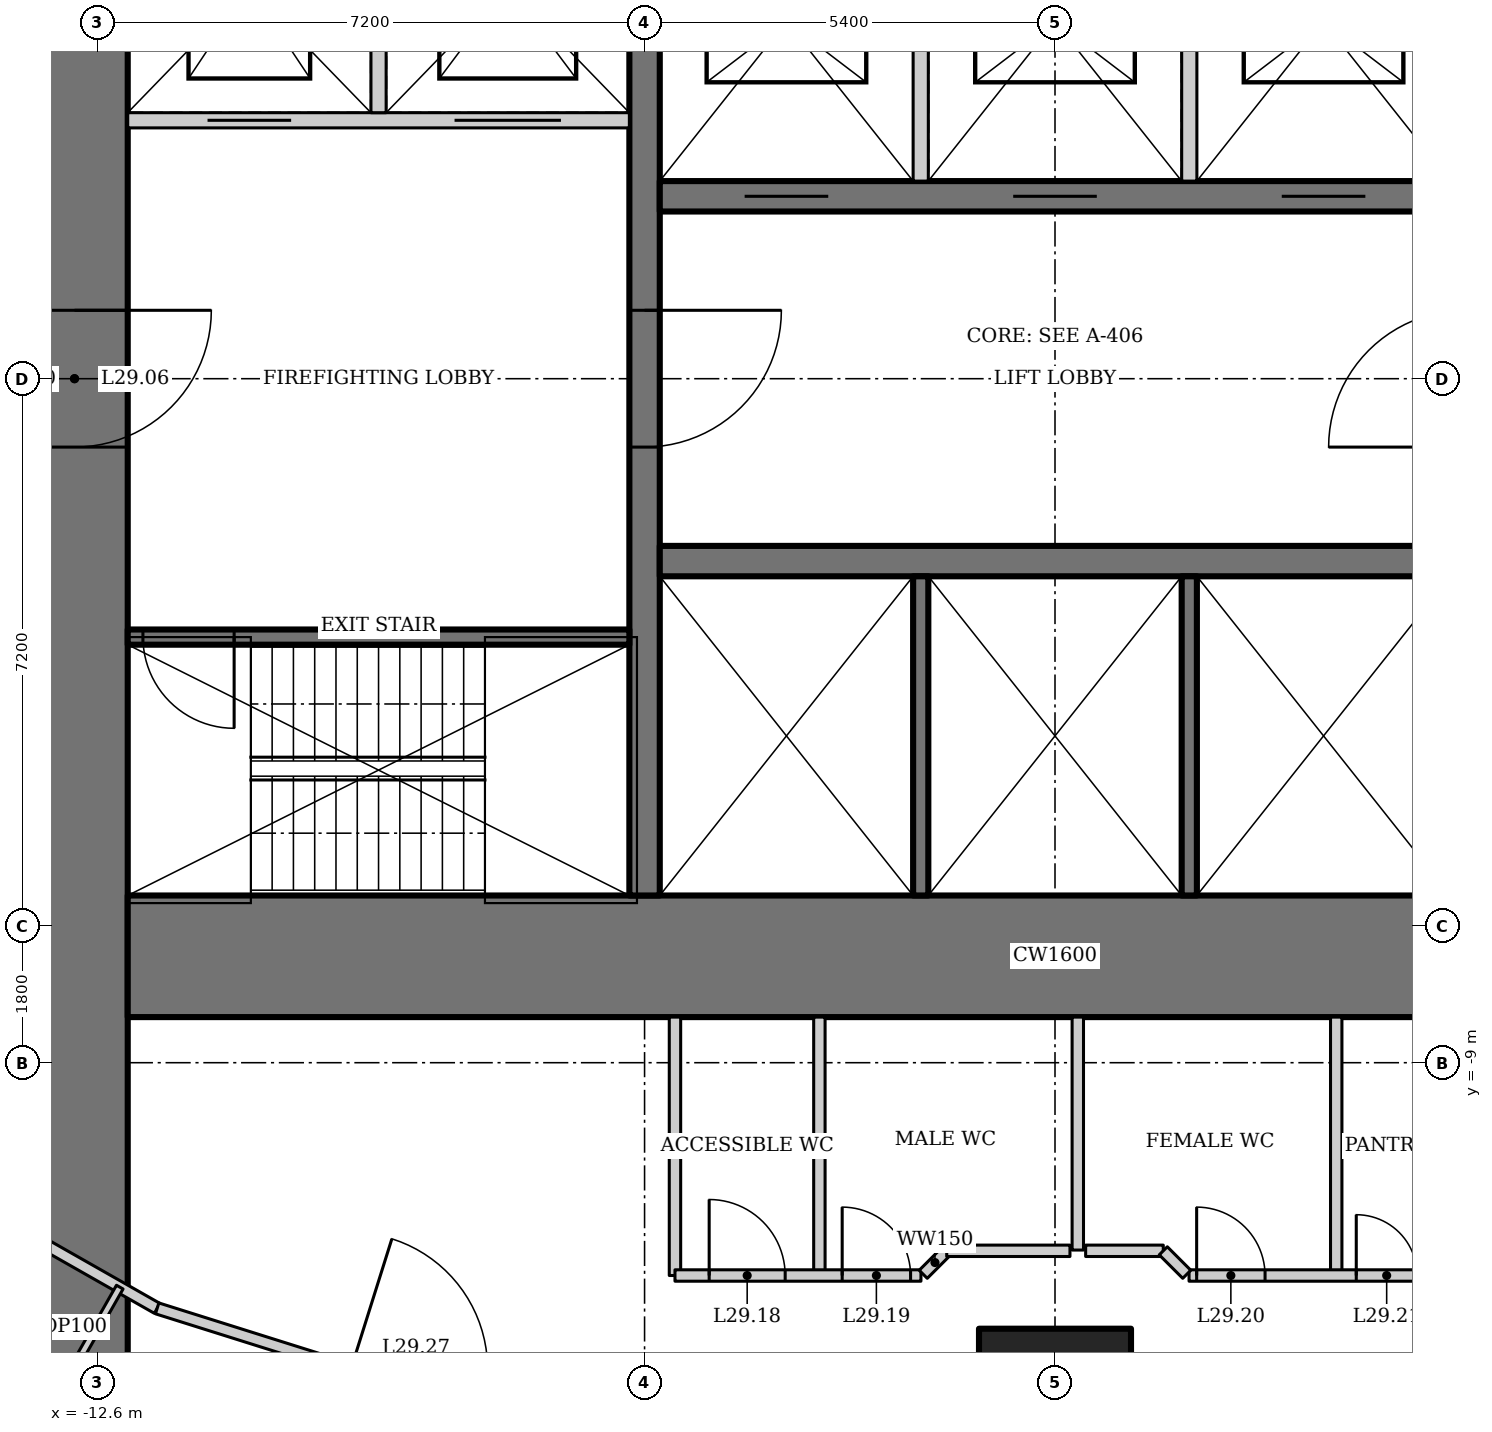
"""IFC4 building model, lengths in metres.
Left out: names, types, materials, properties, quantities, classifications, styles, units other than length and angle.
Written with IfcOpenShell. Run it as: python <this file> out.ifc"""

import sys

from ifc_helpers import new_model, si_unit, direction, frame, frame_2d, origin, origin_2d, place, context, subcontext, project, spatial, rectangle, hollow_rectangle, extrude, element, fill, save


model = new_model("IFC4")
c1 = context("Model", 3, precision=1e-05, world=origin(), true_north=direction((0.0, 1.0)))
c2 = subcontext(c1, "Body", "Model", "MODEL_VIEW")
j1 = project(units=[si_unit("LENGTHUNIT", "METRE"), si_unit("PLANEANGLEUNIT", "RADIAN")], contexts=[c1])
p1 = place(None, origin())
s1 = spatial("IfcSite", under=j1, at=p1, CompositionType="ELEMENT")
p2 = place(p1, origin())
s2 = spatial("IfcBuilding", under=s1, at=p2, CompositionType="ELEMENT")
p3 = place(p2, frame((0.0, 0.0, 125.8)))
s3 = spatial("IfcBuildingStorey", under=s2, at=p3, CompositionType="ELEMENT", Elevation=125.8)
p4 = place(p3, frame((0.0, -13.5, 0.0), z_axis=(0.0, 0.0, 1.0), x_axis=(1.0, 0.0, 0.0)))
e1 = element("IfcColumn", 1, at=p4, inside=s3, PredefinedType="COLUMN", context=c2, shape_type="SweptSolid", body=[
    extrude(hollow_rectangle(XDim=2.0, YDim=2.0, WallThickness=0.17, at=origin_2d()), origin(), (0.0, 0.0, 1.0), 4.2),
])
p5 = place(p3, frame((-12.9, 13.0, 0.0), z_axis=(0.0, 0.0, 1.0), x_axis=(0.0, -1.0, 0.0)))
e2 = element("IfcWall", 2, at=p5, inside=s3, PredefinedType="SHEAR", context=c2, shape_type="SweptSolid", body=[
    extrude(rectangle(XDim=26.0, YDim=1.4, at=frame_2d((13.0, 0.0))), origin(), (0.0, 0.0, 1.0), 4.2),
])
p6 = place(p5, frame((12.1, 0.0, 0.0)))
e3 = element("IfcOpeningElement", 3, at=p6, cuts=e2, PredefinedType="OPENING", context=c2, shape_type="SweptSolid", body=[
    extrude(rectangle(XDim=1.8, YDim=2.1, at=frame_2d((0.9, 1.05))), frame((0.0, 0.71, 0.0), z_axis=(0.0, -1.0, 0.0), x_axis=(1.0, 0.0, 0.0)), (0.0, 0.0, 1.0), 1.42),
])
p7 = place(p3, frame((-12.2, -7.6, 0.0), z_axis=(0.0, 0.0, 1.0), x_axis=(1.0, 0.0, 0.0)))
e4 = element("IfcWall", 4, at=p7, inside=s3, PredefinedType="SHEAR", context=c2, shape_type="SweptSolid", body=[
    extrude(rectangle(XDim=24.4, YDim=1.6, at=frame_2d((12.2, 0.0))), origin(), (0.0, 0.0, 1.0), 4.2),
])
p8 = place(p3, frame((-5.4, 6.8, 0.0), z_axis=(0.0, 0.0, 1.0), x_axis=(0.0, -1.0, 0.0)))
e5 = element("IfcWall", 5, at=p8, inside=s3, PredefinedType="SHEAR", context=c2, shape_type="SweptSolid", body=[
    extrude(rectangle(XDim=13.6, YDim=0.4, at=frame_2d((6.8, 0.0))), origin(), (0.0, 0.0, 1.0), 4.2),
])
p9 = place(p8, frame((5.9, 0.0, 0.0)))
e6 = element("IfcOpeningElement", 6, at=p9, cuts=e5, PredefinedType="OPENING", context=c2, shape_type="SweptSolid", body=[
    extrude(rectangle(XDim=1.8, YDim=2.1, at=frame_2d((0.9, 1.05))), frame((0.0, 0.21, 0.0), z_axis=(0.0, -1.0, 0.0), x_axis=(1.0, 0.0, 0.0)), (0.0, 0.0, 1.0), 0.42),
])
p10 = place(p3, frame((-5.2, -2.4, 0.0), z_axis=(0.0, 0.0, 1.0), x_axis=(1.0, 0.0, 0.0)))
e7 = element("IfcWall", 7, at=p10, inside=s3, PredefinedType="SHEAR", context=c2, shape_type="SweptSolid", body=[
    extrude(rectangle(XDim=10.4, YDim=0.4, at=frame_2d((5.2, 0.0))), origin(), (0.0, 0.0, 1.0), 4.2),
])
for number, where, z_axis, x_axis in (
    (8, (-1.767, -2.6, 0.0), (0.0, 0.0, 1.0), (0.0, -1.0, 0.0)),
    (9, (1.767, -2.6, 0.0), (0.0, 0.0, 1.0), (0.0, -1.0, 0.0)),
):
    element("IfcWall", number, at=place(p3, frame(where, z_axis=z_axis, x_axis=x_axis)), inside=s3, PredefinedType="SOLIDWALL", context=c2, shape_type="SweptSolid", body=[
        extrude(rectangle(XDim=4.2, YDim=0.2, at=frame_2d((2.1, 0.0))), origin(), (0.0, 0.0, 1.0), 4.2),
    ])
p11 = place(p3, frame((5.2, 2.4, 0.0), z_axis=(0.0, 0.0, 1.0), x_axis=(-1.0, 0.0, 0.0)))
e10 = element("IfcWall", 10, at=p11, inside=s3, PredefinedType="SHEAR", context=c2, shape_type="SweptSolid", body=[
    extrude(rectangle(XDim=10.4, YDim=0.4, at=frame_2d((5.2, 0.0))), origin(), (0.0, 0.0, 1.0), 4.2),
])
p12 = place(p11, frame((8.183, 0.0, 0.0)))
e11 = element("IfcOpeningElement", 11, at=p12, cuts=e10, PredefinedType="OPENING", context=c2, shape_type="SweptSolid", body=[
    extrude(rectangle(XDim=1.1, YDim=2.2, at=frame_2d((0.55, 1.1))), frame((0.0, 0.21, 0.0), z_axis=(0.0, -1.0, 0.0), x_axis=(1.0, 0.0, 0.0)), (0.0, 0.0, 1.0), 0.42),
])
p13 = place(p11, frame((4.65, 0.0, 0.0)))
e12 = element("IfcOpeningElement", 12, at=p13, cuts=e10, PredefinedType="OPENING", context=c2, shape_type="SweptSolid", body=[
    extrude(rectangle(XDim=1.1, YDim=2.2, at=frame_2d((0.55, 1.1))), frame((0.0, 0.21, 0.0), z_axis=(0.0, -1.0, 0.0), x_axis=(1.0, 0.0, 0.0)), (0.0, 0.0, 1.0), 0.42),
])
p14 = place(p11, frame((1.117, 0.0, 0.0)))
e13 = element("IfcOpeningElement", 13, at=p14, cuts=e10, PredefinedType="OPENING", context=c2, shape_type="SweptSolid", body=[
    extrude(rectangle(XDim=1.1, YDim=2.2, at=frame_2d((0.55, 1.1))), frame((0.0, 0.21, 0.0), z_axis=(0.0, -1.0, 0.0), x_axis=(1.0, 0.0, 0.0)), (0.0, 0.0, 1.0), 0.42),
])
for number, where, z_axis, x_axis in (
    (14, (-1.767, 2.6, 0.0), (0.0, 0.0, 1.0), (0.0, 1.0, 0.0)),
    (15, (1.767, 2.6, 0.0), (0.0, 0.0, 1.0), (0.0, 1.0, 0.0)),
):
    element("IfcWall", number, at=place(p3, frame(where, z_axis=z_axis, x_axis=x_axis)), inside=s3, PredefinedType="SOLIDWALL", context=c2, shape_type="SweptSolid", body=[
        extrude(rectangle(XDim=4.2, YDim=0.2, at=frame_2d((2.1, 0.0))), origin(), (0.0, 0.0, 1.0), 4.2),
    ])
p15 = place(p3, frame((-5.6, -3.4, 0.0), z_axis=(0.0, 0.0, 1.0), x_axis=(-1.0, 0.0, 0.0)))
e16 = element("IfcWall", 16, at=p15, inside=s3, PredefinedType="SHEAR", context=c2, shape_type="SweptSolid", body=[
    extrude(rectangle(XDim=6.6, YDim=0.2, at=frame_2d((3.3, 0.0))), origin(), (0.0, 0.0, 1.0), 4.2),
])
p16 = place(p15, frame((5.2, 0.0, 0.0)))
e17 = element("IfcOpeningElement", 17, at=p16, cuts=e16, PredefinedType="OPENING", context=c2, shape_type="SweptSolid", body=[
    extrude(rectangle(XDim=1.2, YDim=2.1, at=frame_2d((0.6, 1.05))), frame((0.0, 0.11, 0.0), z_axis=(0.0, -1.0, 0.0), x_axis=(1.0, 0.0, 0.0)), (0.0, 0.0, 1.0), 0.22),
])
p17 = place(p3, frame((-12.2, 3.4, 0.0), z_axis=(0.0, 0.0, 1.0), x_axis=(1.0, 0.0, 0.0)))
e18 = element("IfcWall", 18, at=p17, inside=s3, PredefinedType="SOLIDWALL", context=c2, shape_type="SweptSolid", body=[
    extrude(rectangle(XDim=6.6, YDim=0.2, at=frame_2d((3.3, 0.0))), origin(), (0.0, 0.0, 1.0), 4.2),
])
p18 = place(p17, frame((1.05, 0.0, 0.0)))
e19 = element("IfcOpeningElement", 19, at=p18, cuts=e18, PredefinedType="OPENING", context=c2, shape_type="SweptSolid", body=[
    extrude(rectangle(XDim=1.1, YDim=2.2, at=frame_2d((0.55, 1.1))), frame((0.0, 0.11, 0.0), z_axis=(0.0, -1.0, 0.0), x_axis=(1.0, 0.0, 0.0)), (0.0, 0.0, 1.0), 0.22),
])
p19 = place(p17, frame((4.3, 0.0, 0.0)))
e20 = element("IfcOpeningElement", 20, at=p19, cuts=e18, PredefinedType="OPENING", context=c2, shape_type="SweptSolid", body=[
    extrude(rectangle(XDim=1.4, YDim=2.2, at=frame_2d((0.7, 1.1))), frame((0.0, 0.11, 0.0), z_axis=(0.0, -1.0, 0.0), x_axis=(1.0, 0.0, 0.0)), (0.0, 0.0, 1.0), 0.22),
])
p20 = place(p3, frame((-8.9, 3.5, 0.0), z_axis=(0.0, 0.0, 1.0), x_axis=(0.0, 1.0, 0.0)))
e21 = element("IfcWall", 21, at=p20, inside=s3, PredefinedType="SOLIDWALL", context=c2, shape_type="SweptSolid", body=[
    extrude(rectangle(XDim=3.3, YDim=0.2, at=frame_2d((1.65, 0.0))), origin(), (0.0, 0.0, 1.0), 4.2),
])
p21 = place(p3, frame((-16.623, -9.499, 0.0), z_axis=(0.0, 0.0, 1.0), x_axis=(0.869375991036, -0.494151177485, 0.0)))
e22 = element("IfcWall", 22, at=p21, inside=s3, PredefinedType="PARTITIONING", context=c2, shape_type="SweptSolid", body=[
    extrude(rectangle(XDim=5.532, YDim=0.15, at=frame_2d((2.766, 0.0))), origin(), (0.0, 0.0, 1.0), 4.05),
])
p22 = place(p3, frame((-11.813, -12.232, 0.0), z_axis=(0.0, 0.0, 1.0), x_axis=(0.953893934057, -0.300143903101, 0.0)))
e23 = element("IfcWall", 23, at=p22, inside=s3, PredefinedType="PARTITIONING", context=c2, shape_type="SweptSolid", body=[
    extrude(rectangle(XDim=5.042, YDim=0.15, at=frame_2d((2.521, 0.0))), origin(), (0.0, 0.0, 1.0), 4.05),
])
p23 = place(p22, frame((2.671, 0.0, 0.0)))
e24 = element("IfcOpeningElement", 24, at=p23, cuts=e23, PredefinedType="OPENING", context=c2, shape_type="SweptSolid", body=[
    extrude(rectangle(XDim=1.8, YDim=2.1, at=frame_2d((0.9, 1.05))), frame((0.0, 0.085, 0.0), z_axis=(0.0, -1.0, 0.0), x_axis=(1.0, 0.0, 0.0)), (0.0, 0.0, 1.0), 0.17),
])
for number, where, z_axis, x_axis in (
    (25, (-5.0, -8.4, 0.0), (0.0, 0.0, 1.0), (0.0, -1.0, 0.0)),
    (26, (-3.1, -8.4, 0.0), (0.0, 0.0, 1.0), (0.0, -1.0, 0.0)),
    (27, (3.7, -8.4, 0.0), (0.0, 0.0, 1.0), (0.0, -1.0, 0.0)),
):
    element("IfcWall", number, at=place(p3, frame(where, z_axis=z_axis, x_axis=x_axis)), inside=s3, PredefinedType="SOLIDWALL", context=c2, shape_type="SweptSolid", body=[
        extrude(rectangle(XDim=3.4, YDim=0.15, at=frame_2d((1.7, 0.0))), origin(), (0.0, 0.0, 1.0), 4.05),
    ])
p24 = place(p3, frame((-12.9, -13.0, 0.0), z_axis=(0.0, 0.0, 1.0), x_axis=(0.494173075358, 0.869363543974, 0.0)))
e28 = element("IfcWall", 28, at=p24, inside=s3, PredefinedType="PARTITIONING", context=c2, shape_type="SweptSolid", body=[
    extrude(rectangle(XDim=1.204, YDim=0.1, at=frame_2d((0.602, 0.0))), origin(), (0.0, 0.0, 1.0), 4.05),
])
p25 = place(p3, frame((-5.0, -11.8, 0.0), z_axis=(0.0, 0.0, 1.0), x_axis=(1.0, 0.0, 0.0)))
e29 = element("IfcWall", 29, at=p25, inside=s3, PredefinedType="SOLIDWALL", context=c2, shape_type="SweptSolid", body=[
    extrude(rectangle(XDim=3.236, YDim=0.15, at=frame_2d((1.618, 0.0))), origin(), (0.0, 0.0, 1.0), 4.05),
])
p26 = place(p25, frame((0.45, 0.0, 0.0)))
e30 = element("IfcOpeningElement", 30, at=p26, cuts=e29, PredefinedType="OPENING", context=c2, shape_type="SweptSolid", body=[
    extrude(rectangle(XDim=1.0, YDim=2.1, at=frame_2d((0.5, 1.05))), frame((0.0, 0.085, 0.0), z_axis=(0.0, -1.0, 0.0), x_axis=(1.0, 0.0, 0.0)), (0.0, 0.0, 1.0), 0.17),
])
p27 = place(p25, frame((2.2, 0.0, 0.0)))
e31 = element("IfcOpeningElement", 31, at=p27, cuts=e29, PredefinedType="OPENING", context=c2, shape_type="SweptSolid", body=[
    extrude(rectangle(XDim=0.9, YDim=2.1, at=frame_2d((0.45, 1.05))), frame((0.0, 0.085, 0.0), z_axis=(0.0, -1.0, 0.0), x_axis=(1.0, 0.0, 0.0)), (0.0, 0.0, 1.0), 0.17),
])
p28 = place(p3, frame((1.764, -11.8, 0.0), z_axis=(0.0, 0.0, 1.0), x_axis=(1.0, 0.0, 0.0)))
e32 = element("IfcWall", 32, at=p28, inside=s3, PredefinedType="SOLIDWALL", context=c2, shape_type="SweptSolid", body=[
    extrude(rectangle(XDim=3.236, YDim=0.15, at=frame_2d((1.618, 0.0))), origin(), (0.0, 0.0, 1.0), 4.05),
])
p29 = place(p28, frame((0.1, 0.0, 0.0)))
e33 = element("IfcOpeningElement", 33, at=p29, cuts=e32, PredefinedType="OPENING", context=c2, shape_type="SweptSolid", body=[
    extrude(rectangle(XDim=0.9, YDim=2.1, at=frame_2d((0.45, 1.05))), frame((0.0, 0.085, 0.0), z_axis=(0.0, -1.0, 0.0), x_axis=(1.0, 0.0, 0.0)), (0.0, 0.0, 1.0), 0.17),
])
p30 = place(p28, frame((2.2, 0.0, 0.0)))
e34 = element("IfcOpeningElement", 34, at=p30, cuts=e32, PredefinedType="OPENING", context=c2, shape_type="SweptSolid", body=[
    extrude(rectangle(XDim=0.8, YDim=2.1, at=frame_2d((0.4, 1.05))), frame((0.0, 0.085, 0.0), z_axis=(0.0, -1.0, 0.0), x_axis=(1.0, 0.0, 0.0)), (0.0, 0.0, 1.0), 0.17),
])
p31 = place(p3, frame((0.3, -8.4, 0.0), z_axis=(0.0, 0.0, 1.0), x_axis=(0.0, -1.0, 0.0)))
e35 = element("IfcWall", 35, at=p31, inside=s3, PredefinedType="SOLIDWALL", context=c2, shape_type="SweptSolid", body=[
    extrude(rectangle(XDim=3.065, YDim=0.15, at=frame_2d((1.533, 0.0))), origin(), (0.0, 0.0, 1.0), 4.05),
])
p32 = place(p3, frame((-1.734, -11.784, 0.0), z_axis=(0.0, 0.0, 1.0), x_axis=(0.707106781187, 0.707106781187, 0.0)))
e36 = element("IfcWall", 36, at=p32, inside=s3, PredefinedType="SOLIDWALL", context=c2, shape_type="SweptSolid", body=[
    extrude(rectangle(XDim=0.437, YDim=0.15, at=frame_2d((0.219, 0.0))), origin(), (0.0, 0.0, 1.0), 4.05),
])
p33 = place(p3, frame((-1.425, -11.475, 0.0), z_axis=(0.0, 0.0, 1.0), x_axis=(1.0, 0.0, 0.0)))
e37 = element("IfcWall", 37, at=p33, inside=s3, PredefinedType="SOLIDWALL", context=c2, shape_type="SweptSolid", body=[
    extrude(rectangle(XDim=1.621, YDim=0.15, at=frame_2d((0.811, 0.0))), origin(), (0.0, 0.0, 1.0), 4.05),
])
p34 = place(p3, frame((0.403, -11.475, 0.0), z_axis=(0.0, 0.0, 1.0), x_axis=(1.0, 0.0, 0.0)))
e38 = element("IfcWall", 38, at=p34, inside=s3, PredefinedType="SOLIDWALL", context=c2, shape_type="SweptSolid", body=[
    extrude(rectangle(XDim=1.021, YDim=0.15, at=frame_2d((0.511, 0.0))), origin(), (0.0, 0.0, 1.0), 4.05),
])
p35 = place(p3, frame((1.425, -11.475, 0.0), z_axis=(0.0, 0.0, 1.0), x_axis=(0.707106781187, -0.707106781187, 0.0)))
e39 = element("IfcWall", 39, at=p35, inside=s3, PredefinedType="SOLIDWALL", context=c2, shape_type="SweptSolid", body=[
    extrude(rectangle(XDim=0.437, YDim=0.15, at=frame_2d((0.219, 0.0))), origin(), (0.0, 0.0, 1.0), 4.05),
])
p36 = place(p9, origin())
e40 = element("IfcDoor", 40, at=p36, inside=s3, OperationType="DOUBLE_DOOR_DOUBLE_SWING", PredefinedType="DOOR", context=c2, shape_type="SweptSolid", body=[
    extrude(rectangle(XDim=1.8, YDim=2.1, at=frame_2d((0.9, 1.05))), frame((0.0, 0.025, 0.0), z_axis=(0.0, -1.0, 0.0), x_axis=(1.0, 0.0, 0.0)), (0.0, 0.0, 1.0), 0.05),
])
fill(e6, e40)
p37 = place(p16, origin())
e41 = element("IfcDoor", 41, at=p37, inside=s3, OperationType="SINGLE_SWING_RIGHT", PredefinedType="DOOR", context=c2, shape_type="SweptSolid", body=[
    extrude(rectangle(XDim=1.2, YDim=2.1, at=frame_2d((0.6, 1.05))), frame((0.0, 0.025, 0.0), z_axis=(0.0, -1.0, 0.0), x_axis=(1.0, 0.0, 0.0)), (0.0, 0.0, 1.0), 0.05),
])
fill(e17, e41)
p38 = place(p6, origin())
e42 = element("IfcDoor", 42, at=p38, inside=s3, OperationType="DOUBLE_DOOR_DOUBLE_SWING", PredefinedType="DOOR", context=c2, shape_type="SweptSolid", body=[
    extrude(rectangle(XDim=1.8, YDim=2.1, at=frame_2d((0.9, 1.05))), frame((0.0, 0.025, 0.0), z_axis=(0.0, -1.0, 0.0), x_axis=(1.0, 0.0, 0.0)), (0.0, 0.0, 1.0), 0.05),
])
fill(e3, e42)
p39 = place(p12, origin())
e43 = element("IfcDoor", 43, at=p39, inside=s3, OperationType="DOUBLE_DOOR_SLIDING", PredefinedType="DOOR", context=c2, shape_type="SweptSolid", body=[
    extrude(rectangle(XDim=1.1, YDim=2.2, at=frame_2d((0.55, 1.1))), frame((0.0, 0.025, 0.0), z_axis=(0.0, -1.0, 0.0), x_axis=(1.0, 0.0, 0.0)), (0.0, 0.0, 1.0), 0.05),
])
fill(e11, e43)
p40 = place(p13, origin())
e44 = element("IfcDoor", 44, at=p40, inside=s3, OperationType="DOUBLE_DOOR_SLIDING", PredefinedType="DOOR", context=c2, shape_type="SweptSolid", body=[
    extrude(rectangle(XDim=1.1, YDim=2.2, at=frame_2d((0.55, 1.1))), frame((0.0, 0.025, 0.0), z_axis=(0.0, -1.0, 0.0), x_axis=(1.0, 0.0, 0.0)), (0.0, 0.0, 1.0), 0.05),
])
fill(e12, e44)
p41 = place(p14, origin())
e45 = element("IfcDoor", 45, at=p41, inside=s3, OperationType="DOUBLE_DOOR_SLIDING", PredefinedType="DOOR", context=c2, shape_type="SweptSolid", body=[
    extrude(rectangle(XDim=1.1, YDim=2.2, at=frame_2d((0.55, 1.1))), frame((0.0, 0.025, 0.0), z_axis=(0.0, -1.0, 0.0), x_axis=(1.0, 0.0, 0.0)), (0.0, 0.0, 1.0), 0.05),
])
fill(e13, e45)
p42 = place(p18, origin())
e46 = element("IfcDoor", 46, at=p42, inside=s3, OperationType="DOUBLE_DOOR_SLIDING", PredefinedType="DOOR", context=c2, shape_type="SweptSolid", body=[
    extrude(rectangle(XDim=1.1, YDim=2.2, at=frame_2d((0.55, 1.1))), frame((0.0, 0.025, 0.0), z_axis=(0.0, -1.0, 0.0), x_axis=(1.0, 0.0, 0.0)), (0.0, 0.0, 1.0), 0.05),
])
fill(e19, e46)
p43 = place(p19, origin())
e47 = element("IfcDoor", 47, at=p43, inside=s3, OperationType="DOUBLE_DOOR_SLIDING", PredefinedType="DOOR", context=c2, shape_type="SweptSolid", body=[
    extrude(rectangle(XDim=1.4, YDim=2.2, at=frame_2d((0.7, 1.1))), frame((0.0, 0.025, 0.0), z_axis=(0.0, -1.0, 0.0), x_axis=(1.0, 0.0, 0.0)), (0.0, 0.0, 1.0), 0.05),
])
fill(e20, e47)
p44 = place(p26, origin())
e48 = element("IfcDoor", 48, at=p44, inside=s3, OperationType="SINGLE_SWING_LEFT", PredefinedType="DOOR", context=c2, shape_type="SweptSolid", body=[
    extrude(rectangle(XDim=1.0, YDim=2.1, at=frame_2d((0.5, 1.05))), frame((0.0, 0.025, 0.0), z_axis=(0.0, -1.0, 0.0), x_axis=(1.0, 0.0, 0.0)), (0.0, 0.0, 1.0), 0.05),
])
fill(e30, e48)
p45 = place(p27, origin())
e49 = element("IfcDoor", 49, at=p45, inside=s3, OperationType="SINGLE_SWING_LEFT", PredefinedType="DOOR", context=c2, shape_type="SweptSolid", body=[
    extrude(rectangle(XDim=0.9, YDim=2.1, at=frame_2d((0.45, 1.05))), frame((0.0, 0.025, 0.0), z_axis=(0.0, -1.0, 0.0), x_axis=(1.0, 0.0, 0.0)), (0.0, 0.0, 1.0), 0.05),
])
fill(e31, e49)
p46 = place(p29, origin())
e50 = element("IfcDoor", 50, at=p46, inside=s3, OperationType="SINGLE_SWING_LEFT", PredefinedType="DOOR", context=c2, shape_type="SweptSolid", body=[
    extrude(rectangle(XDim=0.9, YDim=2.1, at=frame_2d((0.45, 1.05))), frame((0.0, 0.025, 0.0), z_axis=(0.0, -1.0, 0.0), x_axis=(1.0, 0.0, 0.0)), (0.0, 0.0, 1.0), 0.05),
])
fill(e33, e50)
p47 = place(p30, origin())
e51 = element("IfcDoor", 51, at=p47, inside=s3, OperationType="SINGLE_SWING_LEFT", PredefinedType="DOOR", context=c2, shape_type="SweptSolid", body=[
    extrude(rectangle(XDim=0.8, YDim=2.1, at=frame_2d((0.4, 1.05))), frame((0.0, 0.025, 0.0), z_axis=(0.0, -1.0, 0.0), x_axis=(1.0, 0.0, 0.0)), (0.0, 0.0, 1.0), 0.05),
])
fill(e34, e51)
save(model, sys.argv[1])
